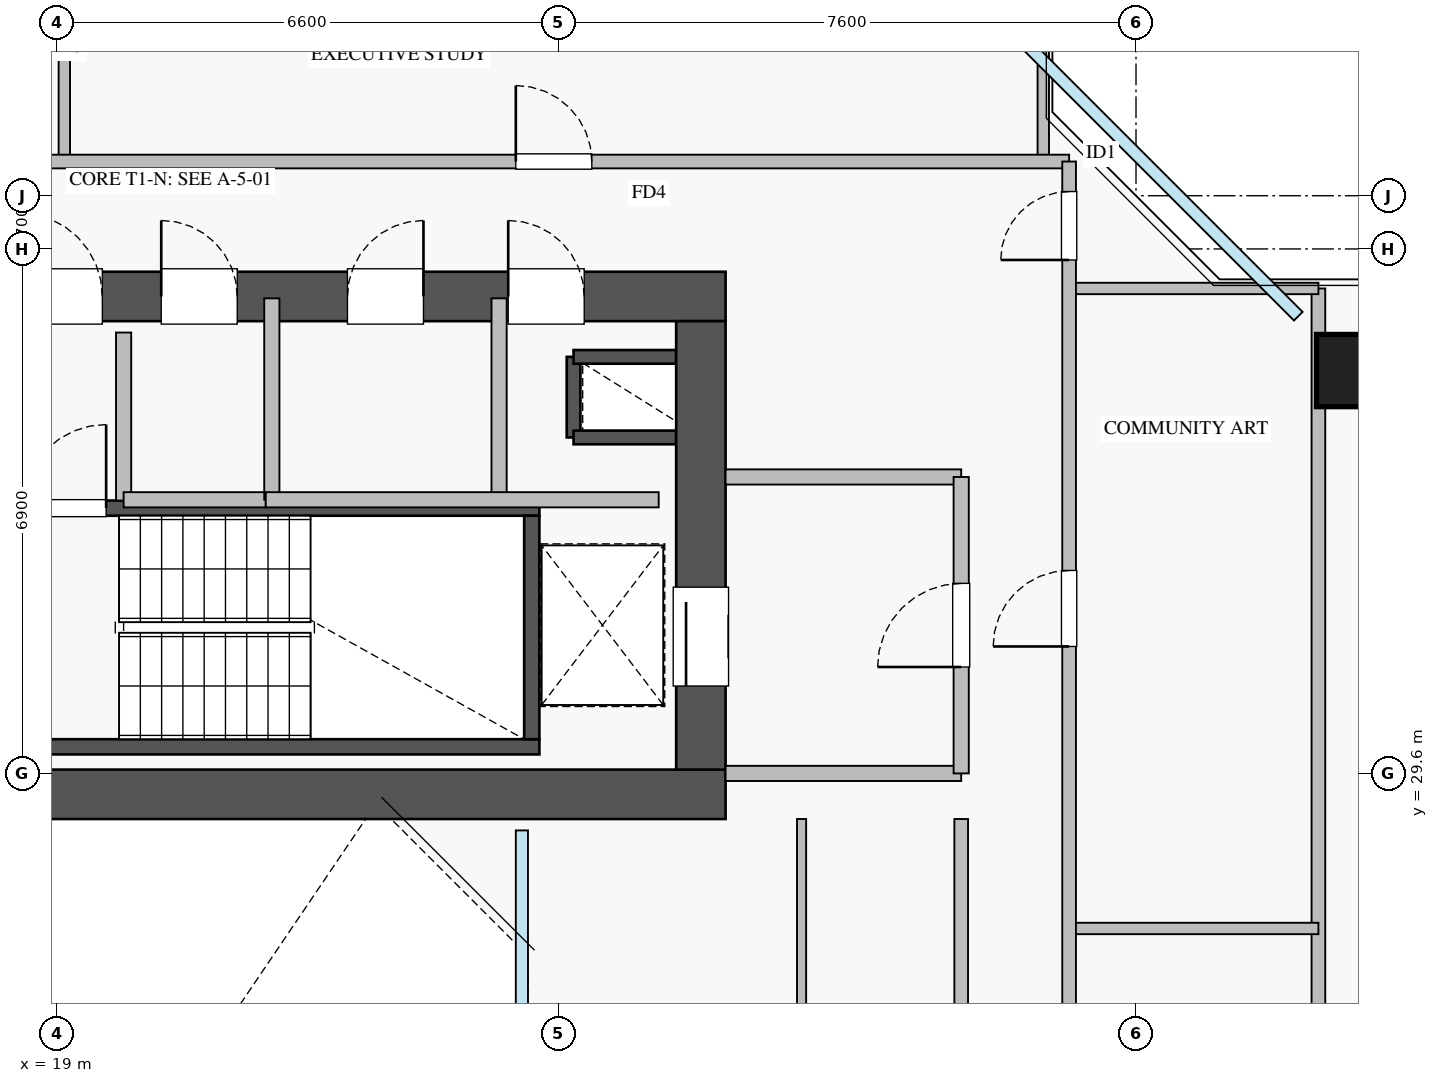
"""IFC4 building model, lengths in metres.
Left out: names, types, materials, properties, quantities, classifications, styles, units other than length and angle.
Written with IfcOpenShell. Run it as: python <this file> out.ifc"""

import sys

from ifc_helpers import new_model, si_unit, direction, frame, frame_2d, origin, origin_2d, place, context, subcontext, project, spatial, rectangle, extrude, source, transform, mapped, element, fill, save


model = new_model("IFC4")
c1 = context("Model", 3, precision=1e-05, world=origin(), true_north=direction((0.0, 1.0)))
c2 = subcontext(c1, "Body", "Model", "MODEL_VIEW")
j1 = project(units=[si_unit("LENGTHUNIT", "METRE"), si_unit("PLANEANGLEUNIT", "RADIAN")], contexts=[c1])
p1 = place(None, origin())
s1 = spatial("IfcSite", under=j1, at=p1, CompositionType="ELEMENT")
p2 = place(p1, origin())
s2 = spatial("IfcBuilding", under=s1, at=p2, CompositionType="ELEMENT")
p3 = place(p2, frame((0.0, 0.0, 176.25)))
s3 = spatial("IfcBuildingStorey", under=s2, at=p3, CompositionType="ELEMENT", Elevation=176.25)
p4 = place(p3, frame((25.8, 34.02, 0.0), z_axis=(0.0, 0.0, 1.0), x_axis=(0.0, 1.0, 0.0)))
e1 = element("IfcWall", 1, at=p4, inside=s3, PredefinedType="SHEAR", context=c2, shape_type="SweptSolid", body=[
    extrude(rectangle(XDim=1.06, YDim=0.18, at=frame_2d((0.53, 0.0))), origin(), (0.0, 0.0, 1.0), 3.07),
])
for number, where, z_axis, x_axis in (
    (2, (25.8, 35.08, 0.0), (0.0, 0.0, 1.0), (1.0, 0.0, 0.0)),
    (3, (25.8, 34.02, 0.0), (0.0, 0.0, 1.0), (1.0, 0.0, 0.0)),
):
    element("IfcWall", number, at=place(p3, frame(where, z_axis=z_axis, x_axis=x_axis)), inside=s3, PredefinedType="SHEAR", context=c2, shape_type="SweptSolid", body=[
        extrude(rectangle(XDim=1.35, YDim=0.18, at=frame_2d((0.675, 0.0))), origin(), (0.0, 0.0, 1.0), 3.07),
    ])
p5 = place(p3, frame((18.2, 29.95, 0.0), z_axis=(0.0, 0.0, 1.0), x_axis=(1.0, 0.0, 0.0)))
e4 = element("IfcWall", 4, at=p5, inside=s3, PredefinedType="SHEAR", context=c2, shape_type="SweptSolid", body=[
    extrude(rectangle(XDim=7.15, YDim=0.2, at=frame_2d((3.575, 0.0))), origin(), (0.0, 0.0, 1.0), 3.25),
])
p6 = place(p3, frame((18.2, 33.09, 0.0), z_axis=(0.0, 0.0, 1.0), x_axis=(1.0, 0.0, 0.0)))
e5 = element("IfcWall", 5, at=p6, inside=s3, PredefinedType="SHEAR", context=c2, shape_type="SweptSolid", body=[
    extrude(rectangle(XDim=7.15, YDim=0.2, at=frame_2d((3.575, 0.0))), origin(), (0.0, 0.0, 1.0), 3.25),
])
p7 = place(p6, frame((0.35, 0.0, 0.0)))
e6 = element("IfcOpeningElement", 6, at=p7, cuts=e5, PredefinedType="OPENING", context=c2, shape_type="SweptSolid", body=[
    extrude(rectangle(XDim=1.1, YDim=2.05, at=frame_2d((0.55, 1.025))), frame((0.0, 0.11, 0.0), z_axis=(0.0, -1.0, 0.0), x_axis=(1.0, 0.0, 0.0)), (0.0, 0.0, 1.0), 0.22),
])
p8 = place(p3, frame((25.25, 30.05, 0.0), z_axis=(0.0, 0.0, 1.0), x_axis=(0.0, 1.0, 0.0)))
e7 = element("IfcWall", 7, at=p8, inside=s3, PredefinedType="SHEAR", context=c2, shape_type="SweptSolid", body=[
    extrude(rectangle(XDim=2.94, YDim=0.2, at=frame_2d((1.47, 0.0))), origin(), (0.0, 0.0, 1.0), 3.25),
])
p9 = place(p3, frame((10.2, 29.325, 0.0), z_axis=(0.0, 0.0, 1.0), x_axis=(1.0, 0.0, 0.0)))
e8 = element("IfcWall", 8, at=p9, inside=s3, PredefinedType="SHEAR", context=c2, shape_type="SweptSolid", body=[
    extrude(rectangle(XDim=17.6, YDim=0.65, at=frame_2d((8.8, 0.0))), origin(), (0.0, 0.0, 1.0), 3.25),
])
p10 = place(p3, frame((10.2, 35.875, 0.0), z_axis=(0.0, 0.0, 1.0), x_axis=(1.0, 0.0, 0.0)))
e9 = element("IfcWall", 9, at=p10, inside=s3, PredefinedType="SHEAR", context=c2, shape_type="SweptSolid", body=[
    extrude(rectangle(XDim=17.6, YDim=0.65, at=frame_2d((8.8, 0.0))), origin(), (0.0, 0.0, 1.0), 3.25),
])
p11 = place(p10, frame((1.15, 0.0, 0.0)))
e10 = element("IfcOpeningElement", 10, at=p11, cuts=e9, PredefinedType="OPENING", context=c2, shape_type="SweptSolid", body=[
    extrude(rectangle(XDim=1.1, YDim=2.05, at=frame_2d((0.55, 1.025))), frame((0.0, 0.335, 0.0), z_axis=(0.0, -1.0, 0.0), x_axis=(1.0, 0.0, 0.0)), (0.0, 0.0, 1.0), 0.67),
])
p12 = place(p10, frame((8.3, 0.0, 0.0)))
e11 = element("IfcOpeningElement", 11, at=p12, cuts=e9, PredefinedType="OPENING", context=c2, shape_type="SweptSolid", body=[
    extrude(rectangle(XDim=1.1, YDim=2.05, at=frame_2d((0.55, 1.025))), frame((0.0, 0.335, 0.0), z_axis=(0.0, -1.0, 0.0), x_axis=(1.0, 0.0, 0.0)), (0.0, 0.0, 1.0), 0.67),
])
p13 = place(p10, frame((4.9, 0.0, 0.0)))
e12 = element("IfcOpeningElement", 12, at=p13, cuts=e9, PredefinedType="OPENING", context=c2, shape_type="SweptSolid", body=[
    extrude(rectangle(XDim=1.1, YDim=2.05, at=frame_2d((0.55, 1.025))), frame((0.0, 0.335, 0.0), z_axis=(0.0, -1.0, 0.0), x_axis=(1.0, 0.0, 0.0)), (0.0, 0.0, 1.0), 0.67),
])
p14 = place(p10, frame((14.74, 0.0, 0.0)))
e13 = element("IfcOpeningElement", 13, at=p14, cuts=e9, PredefinedType="OPENING", context=c2, shape_type="SweptSolid", body=[
    extrude(rectangle(XDim=1.0, YDim=2.05, at=frame_2d((0.5, 1.025))), frame((0.0, 0.335, 0.0), z_axis=(0.0, -1.0, 0.0), x_axis=(1.0, 0.0, 0.0)), (0.0, 0.0, 1.0), 0.67),
])
p15 = place(p10, frame((10.175, 0.0, 0.0)))
e14 = element("IfcOpeningElement", 14, at=p15, cuts=e9, PredefinedType="OPENING", context=c2, shape_type="SweptSolid", body=[
    extrude(rectangle(XDim=1.0, YDim=2.05, at=frame_2d((0.5, 1.025))), frame((0.0, 0.335, 0.0), z_axis=(0.0, -1.0, 0.0), x_axis=(1.0, 0.0, 0.0)), (0.0, 0.0, 1.0), 0.67),
])
p16 = place(p10, frame((12.625, 0.0, 0.0)))
e15 = element("IfcOpeningElement", 15, at=p16, cuts=e9, PredefinedType="OPENING", context=c2, shape_type="SweptSolid", body=[
    extrude(rectangle(XDim=1.0, YDim=2.05, at=frame_2d((0.5, 1.025))), frame((0.0, 0.335, 0.0), z_axis=(0.0, -1.0, 0.0), x_axis=(1.0, 0.0, 0.0)), (0.0, 0.0, 1.0), 0.67),
])
p17 = place(p3, frame((27.475, 29.65, 0.0), z_axis=(0.0, 0.0, 1.0), x_axis=(0.0, 1.0, 0.0)))
e16 = element("IfcWall", 16, at=p17, inside=s3, PredefinedType="SHEAR", context=c2, shape_type="SweptSolid", body=[
    extrude(rectangle(XDim=5.9, YDim=0.65, at=frame_2d((2.95, 0.0))), origin(), (0.0, 0.0, 1.0), 3.25),
])
p18 = place(p17, frame((1.1, 0.0, 0.0)))
e17 = element("IfcOpeningElement", 17, at=p18, cuts=e16, PredefinedType="OPENING", context=c2, shape_type="SweptSolid", body=[
    extrude(rectangle(XDim=1.3, YDim=2.05, at=frame_2d((0.65, 1.025))), frame((0.0, 0.335, 0.0), z_axis=(0.0, -1.0, 0.0), x_axis=(1.0, 0.0, 0.0)), (0.0, 0.0, 1.0), 0.67),
])
m1 = source(origin(), c2, "Body", "SweptSolid", [
    extrude(rectangle(XDim=0.95, YDim=0.95, at=origin_2d()), origin(), (0.0, 0.0, 1.0), 3.25),
])
p19 = place(p3, frame((36.05, 34.9, 0.0), z_axis=(0.0, 0.0, 1.0), x_axis=(1.0, 0.0, 0.0)))
e18 = element("IfcColumn", 18, at=p19, inside=s3, PredefinedType="COLUMN", context=c2, shape_type="MappedRepresentation", body=[
    mapped(m1, transform((0.0, 0.0, 0.0), x_axis=(1.0, 0.0, 0.0), y_axis=(0.0, 1.0, 0.0), z_axis=(0.0, 0.0, 1.0), scale=1.0)),
])
for number, where, z_axis, x_axis in (
    (19, (27.8, 29.6, 0.0), (0.0, 0.0, 1.0), (1.0, 0.0, 0.0)),
    (20, (27.8, 33.5, 0.0), (0.0, 0.0, 1.0), (1.0, 0.0, 0.0)),
):
    element("IfcWall", number, at=place(p3, frame(where, z_axis=z_axis, x_axis=x_axis)), inside=s3, PredefinedType="PARTITIONING", context=c2, shape_type="SweptSolid", body=[
        extrude(rectangle(XDim=3.1, YDim=0.2, at=frame_2d((1.55, 0.0))), origin(), (0.0, 0.0, 1.0), 3.07),
    ])
p20 = place(p3, frame((30.9, 29.6, 0.0), z_axis=(0.0, 0.0, 1.0), x_axis=(0.0, 1.0, 0.0)))
e21 = element("IfcWall", 21, at=p20, inside=s3, PredefinedType="PARTITIONING", context=c2, shape_type="SweptSolid", body=[
    extrude(rectangle(XDim=3.9, YDim=0.2, at=frame_2d((1.95, 0.0))), origin(), (0.0, 0.0, 1.0), 3.07),
])
p21 = place(p20, frame((1.4, 0.0, 0.0)))
e22 = element("IfcOpeningElement", 22, at=p21, cuts=e21, PredefinedType="OPENING", context=c2, shape_type="SweptSolid", body=[
    extrude(rectangle(XDim=1.1, YDim=2.05, at=frame_2d((0.55, 1.025))), frame((0.0, 0.11, 0.0), z_axis=(0.0, -1.0, 0.0), x_axis=(1.0, 0.0, 0.0)), (0.0, 0.0, 1.0), 0.22),
])
p22 = place(p3, frame((19.88, 33.19, 0.0), z_axis=(0.0, 0.0, 1.0), x_axis=(0.0, 1.0, 0.0)))
e23 = element("IfcWall", 23, at=p22, inside=s3, PredefinedType="PARTITIONING", context=c2, shape_type="SweptSolid", body=[
    extrude(rectangle(XDim=2.21, YDim=0.2, at=frame_2d((1.105, 0.0))), origin(), (0.0, 0.0, 1.0), 3.07),
])
p23 = place(p3, frame((24.82, 33.2, 0.0), z_axis=(0.0, 0.0, 1.0), x_axis=(0.0, 1.0, 0.0)))
e24 = element("IfcWall", 24, at=p23, inside=s3, PredefinedType="PARTITIONING", context=c2, shape_type="SweptSolid", body=[
    extrude(rectangle(XDim=2.65, YDim=0.2, at=frame_2d((1.325, 0.0))), origin(), (0.0, 0.0, 1.0), 3.07),
])
p24 = place(p3, frame((19.88, 33.2, 0.0), z_axis=(0.0, 0.0, 1.0), x_axis=(1.0, 0.0, 0.0)))
e25 = element("IfcWall", 25, at=p24, inside=s3, PredefinedType="PARTITIONING", context=c2, shape_type="SweptSolid", body=[
    extrude(rectangle(XDim=1.87, YDim=0.2, at=frame_2d((0.935, 0.0))), origin(), (0.0, 0.0, 1.0), 3.07),
])
p25 = place(p3, frame((21.83, 33.2, 0.0), z_axis=(0.0, 0.0, 1.0), x_axis=(0.0, 1.0, 0.0)))
e26 = element("IfcWall", 26, at=p25, inside=s3, PredefinedType="PARTITIONING", context=c2, shape_type="SweptSolid", body=[
    extrude(rectangle(XDim=2.65, YDim=0.2, at=frame_2d((1.325, 0.0))), origin(), (0.0, 0.0, 1.0), 3.07),
])
p26 = place(p3, frame((21.75, 33.2, 0.0), z_axis=(0.0, 0.0, 1.0), x_axis=(1.0, 0.0, 0.0)))
e27 = element("IfcWall", 27, at=p26, inside=s3, PredefinedType="PARTITIONING", context=c2, shape_type="SweptSolid", body=[
    extrude(rectangle(XDim=5.17, YDim=0.2, at=frame_2d((2.585, 0.0))), origin(), (0.0, 0.0, 1.0), 3.07),
])
p27 = place(p3, frame((35.6, 10.02, 0.0), z_axis=(0.0, 0.0, 1.0), x_axis=(0.0, 1.0, 0.0)))
e28 = element("IfcWall", 28, at=p27, inside=s3, PredefinedType="PARTITIONING", context=c2, shape_type="SweptSolid", body=[
    extrude(rectangle(XDim=25.96, YDim=0.18, at=frame_2d((12.98, 0.0))), origin(), (0.0, 0.0, 1.0), 3.07),
])
p28 = place(p3, frame((19.1, 37.65, 0.0), z_axis=(0.0, 0.0, 1.0), x_axis=(0.0, 1.0, 0.0)))
e29 = element("IfcWall", 29, at=p28, inside=s3, PredefinedType="PARTITIONING", context=c2, shape_type="SweptSolid", body=[
    extrude(rectangle(XDim=3.0, YDim=0.15, at=frame_2d((1.5, 0.0))), origin(), (0.0, 0.0, 1.0), 2.815),
])
p29 = place(p3, frame((31.98, 37.65, 0.0), z_axis=(0.0, 0.0, 1.0), x_axis=(0.0, 1.0, 0.0)))
e30 = element("IfcWall", 30, at=p29, inside=s3, PredefinedType="PARTITIONING", context=c2, shape_type="SweptSolid", body=[
    extrude(rectangle(XDim=3.0, YDim=0.15, at=frame_2d((1.5, 0.0))), origin(), (0.0, 0.0, 1.0), 3.07),
])
p30 = place(p3, frame((8.78, 37.65, 0.0), z_axis=(0.0, 0.0, 1.0), x_axis=(1.0, 0.0, 0.0)))
e31 = element("IfcWall", 31, at=p30, inside=s3, PredefinedType="PARTITIONING", context=c2, shape_type="SweptSolid", body=[
    extrude(rectangle(XDim=23.54, YDim=0.18, at=frame_2d((11.77, 0.0))), origin(), (0.0, 0.0, 1.0), 3.07),
])
p31 = place(p30, frame((4.66, 0.0, 0.0)))
e32 = element("IfcOpeningElement", 32, at=p31, cuts=e31, PredefinedType="OPENING", context=c2, shape_type="SweptSolid", body=[
    extrude(rectangle(XDim=1.0, YDim=2.05, at=frame_2d((0.5, 1.025))), frame((0.0, 0.1, 0.0), z_axis=(0.0, -1.0, 0.0), x_axis=(1.0, 0.0, 0.0)), (0.0, 0.0, 1.0), 0.2),
])
p32 = place(p30, frame((16.26, 0.0, 0.0)))
e33 = element("IfcOpeningElement", 33, at=p32, cuts=e31, PredefinedType="OPENING", context=c2, shape_type="SweptSolid", body=[
    extrude(rectangle(XDim=1.0, YDim=2.05, at=frame_2d((0.5, 1.025))), frame((0.0, 0.1, 0.0), z_axis=(0.0, -1.0, 0.0), x_axis=(1.0, 0.0, 0.0)), (0.0, 0.0, 1.0), 0.2),
])
for number, where, z_axis, x_axis in (
    (34, (32.32, 35.98, 0.0), (0.0, 0.0, 1.0), (1.0, 0.0, 0.0)),
    (35, (32.32, 27.56, 0.0), (0.0, 0.0, 1.0), (1.0, 0.0, 0.0)),
):
    element("IfcWall", number, at=place(p3, frame(where, z_axis=z_axis, x_axis=x_axis)), inside=s3, PredefinedType="PARTITIONING", context=c2, shape_type="SweptSolid", body=[
        extrude(rectangle(XDim=3.28, YDim=0.15, at=frame_2d((1.64, 0.0))), origin(), (0.0, 0.0, 1.0), 3.07),
    ])
p33 = place(p3, frame((32.32, 8.31, 0.0), z_axis=(0.0, 0.0, 1.0), x_axis=(0.0, 1.0, 0.0)))
e36 = element("IfcWall", 36, at=p33, inside=s3, PredefinedType="PARTITIONING", context=c2, shape_type="SweptSolid", body=[
    extrude(rectangle(XDim=29.34, YDim=0.18, at=frame_2d((14.67, 0.0))), origin(), (0.0, 0.0, 1.0), 3.07),
])
p34 = place(p33, frame((28.045, 0.0, 0.0)))
e37 = element("IfcOpeningElement", 37, at=p34, cuts=e36, PredefinedType="OPENING", context=c2, shape_type="SweptSolid", body=[
    extrude(rectangle(XDim=0.9, YDim=2.05, at=frame_2d((0.45, 1.025))), frame((0.0, 0.1, 0.0), z_axis=(0.0, -1.0, 0.0), x_axis=(1.0, 0.0, 0.0)), (0.0, 0.0, 1.0), 0.2),
])
p35 = place(p33, frame((0.415, 0.0, 0.0)))
e38 = element("IfcOpeningElement", 38, at=p35, cuts=e36, PredefinedType="OPENING", context=c2, shape_type="SweptSolid", body=[
    extrude(rectangle(XDim=0.9, YDim=2.05, at=frame_2d((0.45, 1.025))), frame((0.0, 0.1, 0.0), z_axis=(0.0, -1.0, 0.0), x_axis=(1.0, 0.0, 0.0)), (0.0, 0.0, 1.0), 0.2),
])
p36 = place(p33, frame((5.325, 0.0, 0.0)))
e39 = element("IfcOpeningElement", 39, at=p36, cuts=e36, PredefinedType="OPENING", context=c2, shape_type="SweptSolid", body=[
    extrude(rectangle(XDim=1.0, YDim=2.05, at=frame_2d((0.5, 1.025))), frame((0.0, 0.1, 0.0), z_axis=(0.0, -1.0, 0.0), x_axis=(1.0, 0.0, 0.0)), (0.0, 0.0, 1.0), 0.2),
])
p37 = place(p33, frame((14.095, 0.0, 0.0)))
e40 = element("IfcOpeningElement", 40, at=p37, cuts=e36, PredefinedType="OPENING", context=c2, shape_type="SweptSolid", body=[
    extrude(rectangle(XDim=1.0, YDim=2.05, at=frame_2d((0.5, 1.025))), frame((0.0, 0.1, 0.0), z_axis=(0.0, -1.0, 0.0), x_axis=(1.0, 0.0, 0.0)), (0.0, 0.0, 1.0), 0.2),
])
p38 = place(p33, frame((22.96, 0.0, 0.0)))
e41 = element("IfcOpeningElement", 41, at=p38, cuts=e36, PredefinedType="OPENING", context=c2, shape_type="SweptSolid", body=[
    extrude(rectangle(XDim=1.0, YDim=2.05, at=frame_2d((0.5, 1.025))), frame((0.0, 0.1, 0.0), z_axis=(0.0, -1.0, 0.0), x_axis=(1.0, 0.0, 0.0)), (0.0, 0.0, 1.0), 0.2),
])
p39 = place(p3, frame((28.8, 23.1, 0.0), z_axis=(0.0, 0.0, 1.0), x_axis=(0.0, 1.0, 0.0)))
e42 = element("IfcWall", 42, at=p39, inside=s3, PredefinedType="PLUMBINGWALL", context=c2, shape_type="SweptSolid", body=[
    extrude(rectangle(XDim=5.9, YDim=0.12, at=frame_2d((2.95, 0.0))), origin(), (0.0, 0.0, 1.0), 3.07),
])
p40 = place(p3, frame((30.9, 17.0, 0.0), z_axis=(0.0, 0.0, 1.0), x_axis=(0.0, 1.0, 0.0)))
e43 = element("IfcWall", 43, at=p40, inside=s3, PredefinedType="PARTITIONING", context=c2, shape_type="SweptSolid", body=[
    extrude(rectangle(XDim=12.0, YDim=0.18, at=frame_2d((6.0, 0.0))), origin(), (0.0, 0.0, 1.0), 3.07),
])
p41 = place(p40, frame((2.36, 0.0, 0.0)))
e44 = element("IfcOpeningElement", 44, at=p41, cuts=e43, PredefinedType="OPENING", context=c2, shape_type="SweptSolid", body=[
    extrude(rectangle(XDim=1.0, YDim=2.05, at=frame_2d((0.5, 1.025))), frame((0.0, 0.1, 0.0), z_axis=(0.0, -1.0, 0.0), x_axis=(1.0, 0.0, 0.0)), (0.0, 0.0, 1.0), 0.2),
])
m2 = source(origin(), c2, "Body", "SweptSolid", [
    extrude(rectangle(XDim=1.3, YDim=2.05, at=frame_2d((0.65, 1.025))), frame((0.0, 0.025, 0.0), z_axis=(0.0, -1.0, 0.0), x_axis=(1.0, 0.0, 0.0)), (0.0, 0.0, 1.0), 0.05),
])
p42 = place(p18, origin())
e45 = element("IfcDoor", 45, at=p42, inside=s3, OperationType="SLIDING_TO_LEFT", PredefinedType="DOOR", context=c2, shape_type="MappedRepresentation", body=[
    mapped(m2, transform((0.0, 0.0, 0.0), x_axis=(1.0, 0.0, 0.0), y_axis=(0.0, 1.0, 0.0), z_axis=(0.0, 0.0, 1.0), scale=1.0)),
])
fill(e17, e45)
m3 = source(origin(), c2, "Body", "SweptSolid", [
    extrude(rectangle(XDim=1.1, YDim=2.05, at=frame_2d((0.55, 1.025))), frame((0.0, 0.025, 0.0), z_axis=(0.0, -1.0, 0.0), x_axis=(1.0, 0.0, 0.0)), (0.0, 0.0, 1.0), 0.05),
])
p43 = place(p12, origin())
e46 = element("IfcDoor", 46, at=p43, inside=s3, OperationType="SINGLE_SWING_LEFT", PredefinedType="DOOR", context=c2, shape_type="MappedRepresentation", body=[
    mapped(m3, transform((0.0, 0.0, 0.0), x_axis=(1.0, 0.0, 0.0), y_axis=(0.0, 1.0, 0.0), z_axis=(0.0, 0.0, 1.0), scale=1.0)),
])
fill(e11, e46)
p44 = place(p7, origin())
e47 = element("IfcDoor", 47, at=p44, inside=s3, OperationType="SINGLE_SWING_RIGHT", PredefinedType="DOOR", context=c2, shape_type="MappedRepresentation", body=[
    mapped(m3, transform((0.0, 0.0, 0.0), x_axis=(1.0, 0.0, 0.0), y_axis=(0.0, 1.0, 0.0), z_axis=(0.0, 0.0, 1.0), scale=1.0)),
])
fill(e6, e47)
m4 = source(origin(), c2, "Body", "SweptSolid", [
    extrude(rectangle(XDim=1.0, YDim=2.05, at=frame_2d((0.5, 1.025))), frame((0.0, 0.025, 0.0), z_axis=(0.0, -1.0, 0.0), x_axis=(1.0, 0.0, 0.0)), (0.0, 0.0, 1.0), 0.05),
])
p45 = place(p14, origin())
e48 = element("IfcDoor", 48, at=p45, inside=s3, OperationType="SINGLE_SWING_LEFT", PredefinedType="DOOR", context=c2, shape_type="MappedRepresentation", body=[
    mapped(m4, transform((0.0, 0.0, 0.0), x_axis=(1.0, 0.0, 0.0), y_axis=(0.0, 1.0, 0.0), z_axis=(0.0, 0.0, 1.0), scale=1.0)),
])
fill(e13, e48)
p46 = place(p15, origin())
e49 = element("IfcDoor", 49, at=p46, inside=s3, OperationType="SINGLE_SWING_LEFT", PredefinedType="DOOR", context=c2, shape_type="MappedRepresentation", body=[
    mapped(m4, transform((0.0, 0.0, 0.0), x_axis=(1.0, 0.0, 0.0), y_axis=(0.0, 1.0, 0.0), z_axis=(0.0, 0.0, 1.0), scale=1.0)),
])
fill(e14, e49)
p47 = place(p16, origin())
e50 = element("IfcDoor", 50, at=p47, inside=s3, OperationType="SINGLE_SWING_RIGHT", PredefinedType="DOOR", context=c2, shape_type="MappedRepresentation", body=[
    mapped(m4, transform((0.0, 0.0, 0.0), x_axis=(1.0, 0.0, 0.0), y_axis=(0.0, 1.0, 0.0), z_axis=(0.0, 0.0, 1.0), scale=1.0)),
])
fill(e15, e50)
p48 = place(p21, origin())
e51 = element("IfcDoor", 51, at=p48, inside=s3, OperationType="SINGLE_SWING_LEFT", PredefinedType="DOOR", context=c2, shape_type="MappedRepresentation", body=[
    mapped(m3, transform((0.0, 0.0, 0.0), x_axis=(1.0, 0.0, 0.0), y_axis=(0.0, 1.0, 0.0), z_axis=(0.0, 0.0, 1.0), scale=1.0)),
])
fill(e22, e51)
p49 = place(p32, origin())
e52 = element("IfcDoor", 52, at=p49, inside=s3, OperationType="SINGLE_SWING_LEFT", PredefinedType="DOOR", context=c2, shape_type="MappedRepresentation", body=[
    mapped(m4, transform((0.0, 0.0, 0.0), x_axis=(1.0, 0.0, 0.0), y_axis=(0.0, 1.0, 0.0), z_axis=(0.0, 0.0, 1.0), scale=1.0)),
])
fill(e33, e52)
m5 = source(origin(), c2, "Body", "SweptSolid", [
    extrude(rectangle(XDim=0.9, YDim=2.05, at=frame_2d((0.45, 1.025))), frame((0.0, 0.025, 0.0), z_axis=(0.0, -1.0, 0.0), x_axis=(1.0, 0.0, 0.0)), (0.0, 0.0, 1.0), 0.05),
])
p50 = place(p34, origin())
e53 = element("IfcDoor", 53, at=p50, inside=s3, OperationType="SINGLE_SWING_LEFT", PredefinedType="DOOR", context=c2, shape_type="MappedRepresentation", body=[
    mapped(m5, transform((0.0, 0.0, 0.0), x_axis=(1.0, 0.0, 0.0), y_axis=(0.0, 1.0, 0.0), z_axis=(0.0, 0.0, 1.0), scale=1.0)),
])
fill(e37, e53)
p51 = place(p38, origin())
e54 = element("IfcDoor", 54, at=p51, inside=s3, OperationType="SINGLE_SWING_LEFT", PredefinedType="DOOR", context=c2, shape_type="MappedRepresentation", body=[
    mapped(m4, transform((0.0, 0.0, 0.0), x_axis=(1.0, 0.0, 0.0), y_axis=(0.0, 1.0, 0.0), z_axis=(0.0, 0.0, 1.0), scale=1.0)),
])
fill(e41, e54)
save(model, sys.argv[1])
